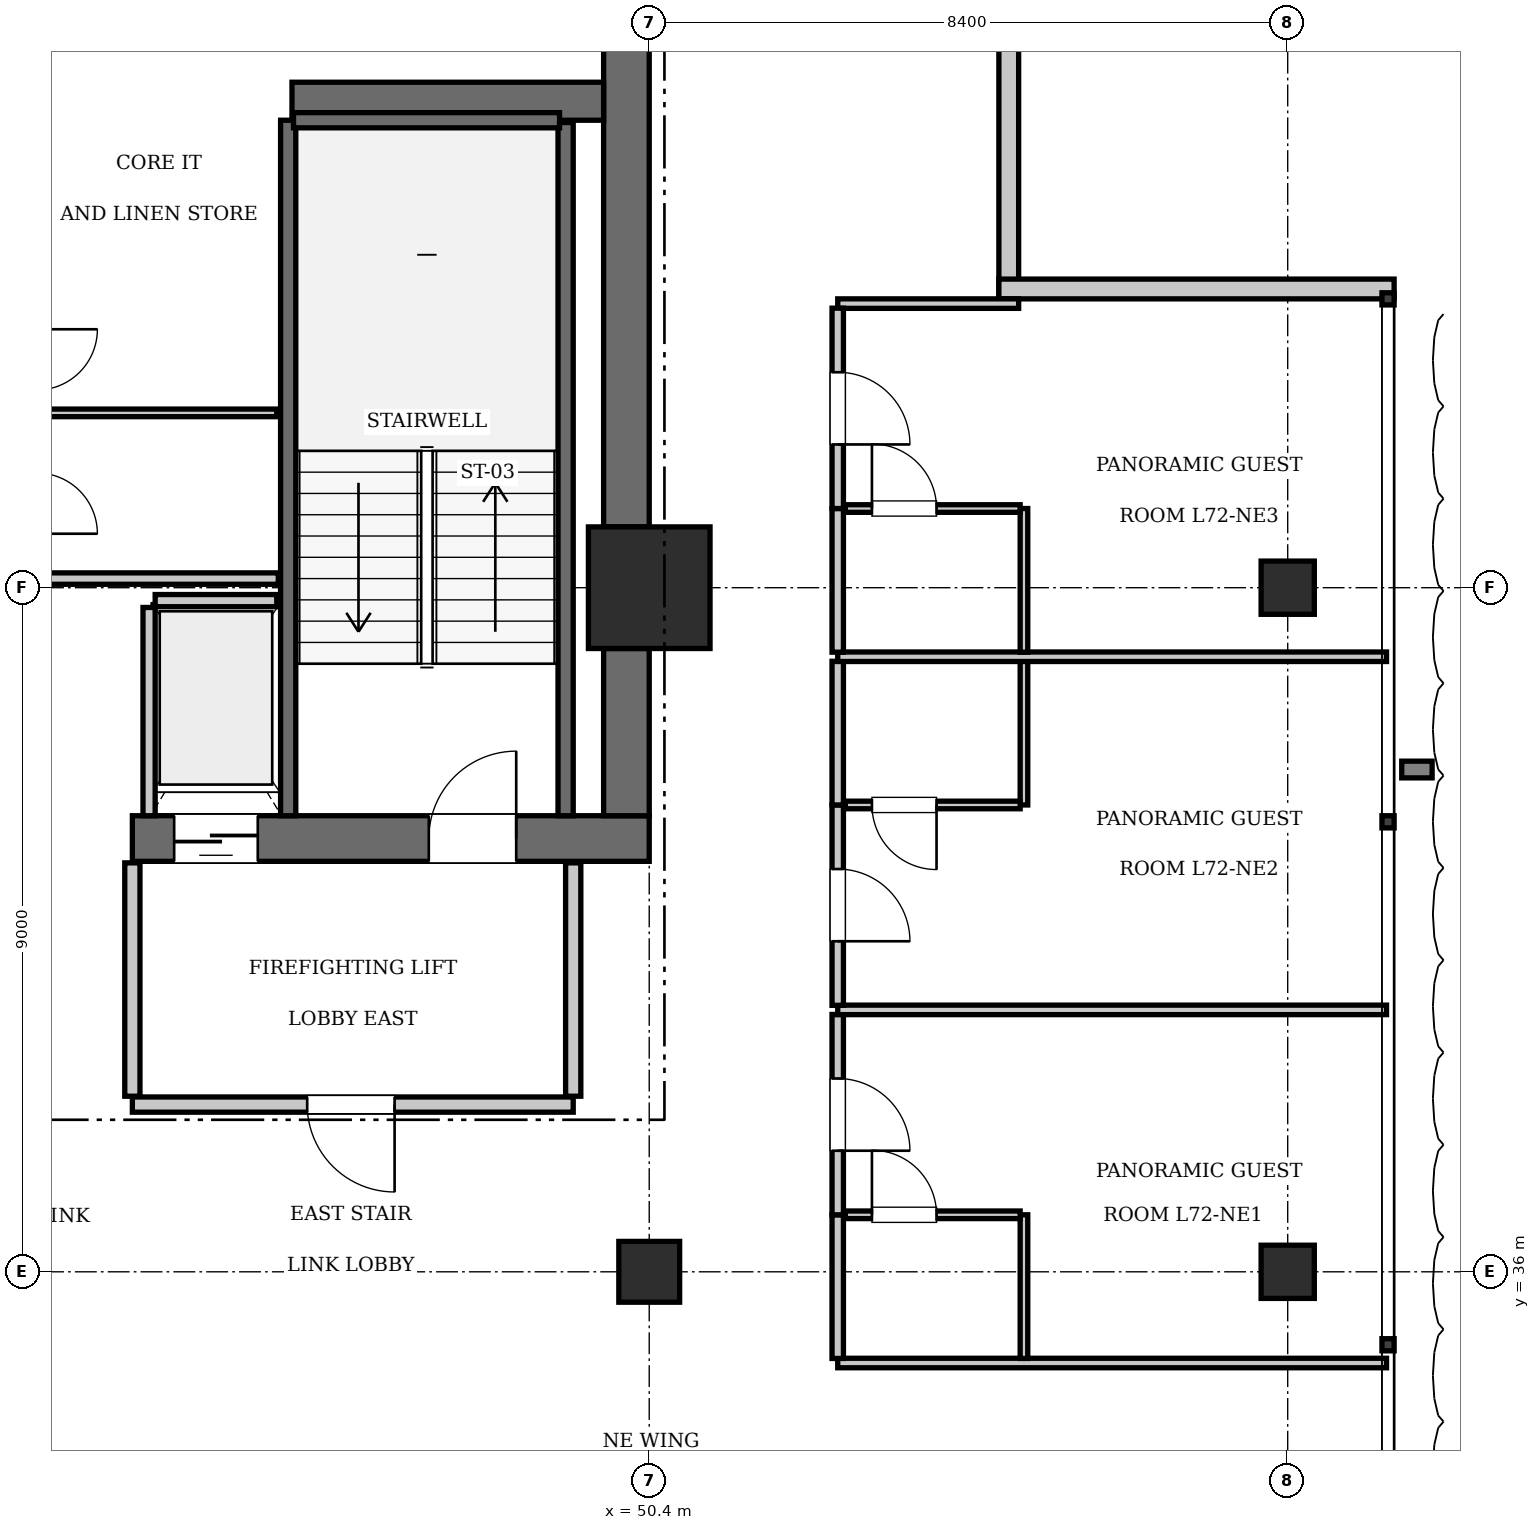
"""IFC4 building model, lengths in metres.
Left out: names, types, materials, properties, quantities, classifications, styles, units other than length and angle.
Written with IfcOpenShell. Run it as: python <this file> out.ifc"""

import sys

from ifc_helpers import new_model, si_unit, direction, frame, frame_2d, origin, origin_2d, place, context, subcontext, project, spatial, rectangle, extrude, element, fill, save


model = new_model("IFC4")
c1 = context("Model", 3, precision=1e-05, world=origin(), true_north=direction((0.0, 1.0)))
c2 = subcontext(c1, "Body", "Model", "MODEL_VIEW")
j1 = project(units=[si_unit("LENGTHUNIT", "METRE"), si_unit("PLANEANGLEUNIT", "RADIAN")], contexts=[c1])
p1 = place(None, origin())
s1 = spatial("IfcSite", under=j1, at=p1, CompositionType="ELEMENT")
p2 = place(p1, origin())
s2 = spatial("IfcBuilding", under=s1, at=p2, CompositionType="ELEMENT")
p3 = place(p2, frame((0.0, 0.0, 293.3)))
s3 = spatial("IfcBuildingStorey", under=s2, at=p3, CompositionType="ELEMENT", Elevation=293.3)
p4 = place(p3, frame((50.4, 45.0, 0.0), z_axis=(0.0, 0.0, 1.0), x_axis=(1.0, 0.0, 0.0)))
e1 = element("IfcColumn", 1, at=p4, inside=s3, PredefinedType="COLUMN", context=c2, shape_type="SweptSolid", body=[
    extrude(rectangle(XDim=1.6, YDim=1.6, at=origin_2d()), origin(), (0.0, 0.0, 1.0), 3.85),
])
p5 = place(p3, frame((43.6, 41.7, 0.0), z_axis=(0.0, 0.0, 1.0), x_axis=(1.0, 0.0, 0.0)))
e2 = element("IfcWall", 2, at=p5, inside=s3, PredefinedType="SHEAR", context=c2, shape_type="SweptSolid", body=[
    extrude(rectangle(XDim=6.8, YDim=0.6, at=frame_2d((3.4, 0.0))), origin(), (0.0, 0.0, 1.0), 3.85),
])
p6 = place(p5, frame((3.9, 0.0, 0.0)))
e3 = element("IfcOpeningElement", 3, at=p6, cuts=e2, PredefinedType="OPENING", context=c2, shape_type="SweptSolid", body=[
    extrude(rectangle(XDim=1.15, YDim=2.15, at=frame_2d((0.575, 1.075))), frame((0.0, 0.31, 0.0), z_axis=(0.0, -1.0, 0.0), x_axis=(1.0, 0.0, 0.0)), (0.0, 0.0, 1.0), 0.62),
])
p7 = place(p5, frame((0.55, 0.0, 0.0)))
e4 = element("IfcOpeningElement", 4, at=p7, cuts=e2, PredefinedType="OPENING", context=c2, shape_type="SweptSolid", body=[
    extrude(rectangle(XDim=1.1, YDim=2.2, at=frame_2d((0.55, 1.1))), frame((0.0, 0.31, 0.0), z_axis=(0.0, -1.0, 0.0), x_axis=(1.0, 0.0, 0.0)), (0.0, 0.0, 1.0), 0.62),
])
p8 = place(p3, frame((50.1, 42.0, 0.0), z_axis=(0.0, 0.0, 1.0), x_axis=(0.0, 1.0, 0.0)))
e5 = element("IfcWall", 5, at=p8, inside=s3, PredefinedType="SHEAR", context=c2, shape_type="SweptSolid", body=[
    extrude(rectangle(XDim=2.2, YDim=0.6, at=frame_2d((1.1, 0.0))), origin(), (0.0, 0.0, 1.0), 3.85),
])
p9 = place(p3, frame((50.1, 45.8, 0.0), z_axis=(0.0, 0.0, 1.0), x_axis=(0.0, 1.0, 0.0)))
e6 = element("IfcWall", 6, at=p9, inside=s3, PredefinedType="SHEAR", context=c2, shape_type="SweptSolid", body=[
    extrude(rectangle(XDim=7.6, YDim=0.6, at=frame_2d((3.8, 0.0))), origin(), (0.0, 0.0, 1.0), 3.85),
])
p10 = place(p3, frame((45.7, 51.4, 0.0), z_axis=(0.0, 0.0, 1.0), x_axis=(1.0, 0.0, 0.0)))
e7 = element("IfcWall", 7, at=p10, inside=s3, PredefinedType="SHEAR", context=c2, shape_type="SweptSolid", body=[
    extrude(rectangle(XDim=4.1, YDim=0.5, at=frame_2d((2.05, 0.0))), origin(), (0.0, 0.0, 1.0), 3.85),
])
p11 = place(p3, frame((50.4, 36.0, 0.0), z_axis=(0.0, 0.0, 1.0), x_axis=(1.0, 0.0, 0.0)))
e8 = element("IfcColumn", 8, at=p11, inside=s3, PredefinedType="COLUMN", context=c2, shape_type="SweptSolid", body=[
    extrude(rectangle(XDim=0.8, YDim=0.8, at=origin_2d()), origin(), (0.0, 0.0, 1.0), 3.85),
])
for number, where, z_axis, x_axis in (
    (9, (58.8, 36.0, 0.0), (0.0, 0.0, 1.0), (1.0, 0.0, 0.0)),
    (10, (58.8, 45.0, 0.0), (0.0, 0.0, 1.0), (1.0, 0.0, 0.0)),
):
    element("IfcColumn", number, at=place(p3, frame(where, z_axis=z_axis, x_axis=x_axis)), inside=s3, PredefinedType="COLUMN", context=c2, shape_type="SweptSolid", body=[
        extrude(rectangle(XDim=0.7, YDim=0.7, at=origin_2d()), origin(), (0.0, 0.0, 1.0), 3.85),
    ])
p12 = place(p3, frame((45.65, 42.0, 0.0), z_axis=(0.0, 0.0, 1.0), x_axis=(0.0, 1.0, 0.0)))
e11 = element("IfcWall", 11, at=p12, inside=s3, PredefinedType="SOLIDWALL", context=c2, shape_type="SweptSolid", body=[
    extrude(rectangle(XDim=9.15, YDim=0.2, at=frame_2d((4.575, 0.0))), origin(), (0.0, 0.0, 1.0), 3.61),
])
p13 = place(p3, frame((49.3, 42.0, 0.0), z_axis=(0.0, 0.0, 1.0), x_axis=(0.0, 1.0, 0.0)))
e12 = element("IfcWall", 12, at=p13, inside=s3, PredefinedType="SOLIDWALL", context=c2, shape_type="SweptSolid", body=[
    extrude(rectangle(XDim=9.12, YDim=0.2, at=frame_2d((4.56, 0.0))), origin(), (0.0, 0.0, 1.0), 3.61),
])
p14 = place(p3, frame((45.72, 51.15, 0.0), z_axis=(0.0, 0.0, 1.0), x_axis=(1.0, 0.0, 0.0)))
e13 = element("IfcWall", 13, at=p14, inside=s3, PredefinedType="SOLIDWALL", context=c2, shape_type="SweptSolid", body=[
    extrude(rectangle(XDim=3.5, YDim=0.2, at=frame_2d((1.75, 0.0))), origin(), (0.0, 0.0, 1.0), 3.61),
])
p15 = place(p3, frame((43.9, 44.83, 0.0), z_axis=(0.0, 0.0, 1.0), x_axis=(1.0, 0.0, 0.0)))
e14 = element("IfcWall", 14, at=p15, inside=s3, PredefinedType="SOLIDWALL", context=c2, shape_type="SweptSolid", body=[
    extrude(rectangle(XDim=1.6, YDim=0.16, at=frame_2d((0.8, 0.0))), origin(), (0.0, 0.0, 1.0), 3.61),
])
p16 = place(p3, frame((43.82, 42.0, 0.0), z_axis=(0.0, 0.0, 1.0), x_axis=(0.0, 1.0, 0.0)))
e15 = element("IfcWall", 15, at=p16, inside=s3, PredefinedType="SOLIDWALL", context=c2, shape_type="SweptSolid", body=[
    extrude(rectangle(XDim=2.74, YDim=0.16, at=frame_2d((1.37, 0.0))), origin(), (0.0, 0.0, 1.0), 3.61),
])
for number, where, z_axis, x_axis in (
    (16, (55.13, 54.0, 0.0), (0.0, 0.0, 1.0), (0.0, -1.0, 0.0)),
    (17, (55.0, 48.93, 0.0), (0.0, 0.0, 1.0), (1.0, 0.0, 0.0)),
):
    element("IfcWall", number, at=place(p3, frame(where, z_axis=z_axis, x_axis=x_axis)), inside=s3, PredefinedType="SOLIDWALL", context=c2, shape_type="SweptSolid", body=[
        extrude(rectangle(XDim=5.2, YDim=0.26, at=frame_2d((2.6, 0.0))), origin(), (0.0, 0.0, 1.0), 3.61),
    ])
p17 = place(p3, frame((43.6, 38.2, 0.0), z_axis=(0.0, 0.0, 1.0), x_axis=(1.0, 0.0, 0.0)))
e18 = element("IfcWall", 18, at=p17, inside=s3, PredefinedType="PARTITIONING", context=c2, shape_type="SweptSolid", body=[
    extrude(rectangle(XDim=5.8, YDim=0.2, at=frame_2d((2.9, 0.0))), origin(), (0.0, 0.0, 1.0), 3.61),
])
p18 = place(p17, frame((2.3, 0.0, 0.0)))
e19 = element("IfcOpeningElement", 19, at=p18, cuts=e18, PredefinedType="OPENING", context=c2, shape_type="SweptSolid", body=[
    extrude(rectangle(XDim=1.15, YDim=2.15, at=frame_2d((0.575, 1.075))), frame((0.0, 0.11, 0.0), z_axis=(0.0, -1.0, 0.0), x_axis=(1.0, 0.0, 0.0)), (0.0, 0.0, 1.0), 0.22),
])
for number, where, z_axis, x_axis in (
    (20, (43.6, 38.31, 0.0), (0.0, 0.0, 1.0), (0.0, 1.0, 0.0)),
    (21, (49.4, 38.31, 0.0), (0.0, 0.0, 1.0), (0.0, 1.0, 0.0)),
):
    element("IfcWall", number, at=place(p3, frame(where, z_axis=z_axis, x_axis=x_axis)), inside=s3, PredefinedType="PARTITIONING", context=c2, shape_type="SweptSolid", body=[
        extrude(rectangle(XDim=3.07, YDim=0.2, at=frame_2d((1.535, 0.0))), origin(), (0.0, 0.0, 1.0), 3.61),
    ])
p19 = place(p3, frame((42.4, 47.3, 0.0), z_axis=(0.0, 0.0, 1.0), x_axis=(1.0, 0.0, 0.0)))
e22 = element("IfcWall", 22, at=p19, inside=s3, PredefinedType="PARTITIONING", context=c2, shape_type="SweptSolid", body=[
    extrude(rectangle(XDim=3.1, YDim=0.1, at=frame_2d((1.55, 0.0))), origin(), (0.0, 0.0, 1.0), 3.61),
])
p20 = place(p3, frame((42.38, 45.12, 0.0), z_axis=(0.0, 0.0, 1.0), x_axis=(1.0, 0.0, 0.0)))
e23 = element("IfcWall", 23, at=p20, inside=s3, PredefinedType="PARTITIONING", context=c2, shape_type="SweptSolid", body=[
    extrude(rectangle(XDim=3.14, YDim=0.15, at=frame_2d((1.57, 0.0))), origin(), (0.0, 0.0, 1.0), 3.61),
])
p21 = place(p3, frame((52.88, 34.8, 0.0), z_axis=(0.0, 0.0, 1.0), x_axis=(1.0, 0.0, 0.0)))
e24 = element("IfcWall", 24, at=p21, inside=s3, PredefinedType="PARTITIONING", context=c2, shape_type="SweptSolid", body=[
    extrude(rectangle(XDim=7.22, YDim=0.125, at=frame_2d((3.61, 0.0))), origin(), (0.0, 0.0, 1.0), 3.61),
])
p22 = place(p3, frame((52.88, 48.738, 0.0), z_axis=(0.0, 0.0, 1.0), x_axis=(1.0, 0.0, 0.0)))
e25 = element("IfcWall", 25, at=p22, inside=s3, PredefinedType="PARTITIONING", context=c2, shape_type="SweptSolid", body=[
    extrude(rectangle(XDim=2.38, YDim=0.125, at=frame_2d((1.19, 0.0))), origin(), (0.0, 0.0, 1.0), 3.61),
])
p23 = place(p3, frame((52.88, 34.86, 0.0), z_axis=(0.0, 0.0, 1.0), x_axis=(0.0, 1.0, 0.0)))
e26 = element("IfcWall", 26, at=p23, inside=s3, PredefinedType="PARTITIONING", context=c2, shape_type="SweptSolid", body=[
    extrude(rectangle(XDim=1.89, YDim=0.15, at=frame_2d((0.945, 0.0))), origin(), (0.0, 0.0, 1.0), 3.61),
])
p24 = place(p3, frame((52.88, 36.75, 0.0), z_axis=(0.0, 0.0, 1.0), x_axis=(0.0, 1.0, 0.0)))
e27 = element("IfcWall", 27, at=p24, inside=s3, PredefinedType="PARTITIONING", context=c2, shape_type="SweptSolid", body=[
    extrude(rectangle(XDim=2.636, YDim=0.15, at=frame_2d((1.318, 0.0))), origin(), (0.0, 0.0, 1.0), 3.61),
])
p25 = place(p24, frame((0.843, 0.0, 0.0)))
e28 = element("IfcOpeningElement", 28, at=p25, cuts=e27, PredefinedType="OPENING", context=c2, shape_type="SweptSolid", body=[
    extrude(rectangle(XDim=0.95, YDim=2.15, at=frame_2d((0.475, 1.075))), frame((0.0, 0.085, 0.0), z_axis=(0.0, -1.0, 0.0), x_axis=(1.0, 0.0, 0.0)), (0.0, 0.0, 1.0), 0.17),
])
p26 = place(p3, frame((55.33, 34.86, 0.0), z_axis=(0.0, 0.0, 1.0), x_axis=(0.0, 1.0, 0.0)))
e29 = element("IfcWall", 29, at=p26, inside=s3, PredefinedType="PARTITIONING", context=c2, shape_type="SweptSolid", body=[
    extrude(rectangle(XDim=1.89, YDim=0.1, at=frame_2d((0.945, 0.0))), origin(), (0.0, 0.0, 1.0), 3.61),
])
p27 = place(p3, frame((52.98, 36.75, 0.0), z_axis=(0.0, 0.0, 1.0), x_axis=(1.0, 0.0, 0.0)))
e30 = element("IfcWall", 30, at=p27, inside=s3, PredefinedType="PARTITIONING", context=c2, shape_type="SweptSolid", body=[
    extrude(rectangle(XDim=2.3, YDim=0.1, at=frame_2d((1.15, 0.0))), origin(), (0.0, 0.0, 1.0), 3.61),
])
p28 = place(p27, frame((0.35, 0.0, 0.0)))
e31 = element("IfcOpeningElement", 31, at=p28, cuts=e30, PredefinedType="OPENING", context=c2, shape_type="SweptSolid", body=[
    extrude(rectangle(XDim=0.85, YDim=2.1, at=frame_2d((0.425, 1.05))), frame((0.0, 0.06, 0.0), z_axis=(0.0, -1.0, 0.0), x_axis=(1.0, 0.0, 0.0)), (0.0, 0.0, 1.0), 0.12),
])
p29 = place(p3, frame((52.88, 39.446, 0.0), z_axis=(0.0, 0.0, 1.0), x_axis=(1.0, 0.0, 0.0)))
e32 = element("IfcWall", 32, at=p29, inside=s3, PredefinedType="PARTITIONING", context=c2, shape_type="SweptSolid", body=[
    extrude(rectangle(XDim=7.22, YDim=0.125, at=frame_2d((3.61, 0.0))), origin(), (0.0, 0.0, 1.0), 3.61),
])
p30 = place(p3, frame((52.88, 39.506, 0.0), z_axis=(0.0, 0.0, 1.0), x_axis=(0.0, 1.0, 0.0)))
e33 = element("IfcWall", 33, at=p30, inside=s3, PredefinedType="PARTITIONING", context=c2, shape_type="SweptSolid", body=[
    extrude(rectangle(XDim=2.636, YDim=0.15, at=frame_2d((1.318, 0.0))), origin(), (0.0, 0.0, 1.0), 3.61),
])
p31 = place(p30, frame((0.843, 0.0, 0.0)))
e34 = element("IfcOpeningElement", 34, at=p31, cuts=e33, PredefinedType="OPENING", context=c2, shape_type="SweptSolid", body=[
    extrude(rectangle(XDim=0.95, YDim=2.15, at=frame_2d((0.475, 1.075))), frame((0.0, 0.085, 0.0), z_axis=(0.0, -1.0, 0.0), x_axis=(1.0, 0.0, 0.0)), (0.0, 0.0, 1.0), 0.17),
])
p32 = place(p3, frame((52.88, 42.142, 0.0), z_axis=(0.0, 0.0, 1.0), x_axis=(0.0, 1.0, 0.0)))
e35 = element("IfcWall", 35, at=p32, inside=s3, PredefinedType="PARTITIONING", context=c2, shape_type="SweptSolid", body=[
    extrude(rectangle(XDim=1.89, YDim=0.15, at=frame_2d((0.945, 0.0))), origin(), (0.0, 0.0, 1.0), 3.61),
])
p33 = place(p3, frame((55.33, 42.142, 0.0), z_axis=(0.0, 0.0, 1.0), x_axis=(0.0, 1.0, 0.0)))
e36 = element("IfcWall", 36, at=p33, inside=s3, PredefinedType="PARTITIONING", context=c2, shape_type="SweptSolid", body=[
    extrude(rectangle(XDim=1.89, YDim=0.1, at=frame_2d((0.945, 0.0))), origin(), (0.0, 0.0, 1.0), 3.61),
])
p34 = place(p3, frame((52.98, 42.142, 0.0), z_axis=(0.0, 0.0, 1.0), x_axis=(1.0, 0.0, 0.0)))
e37 = element("IfcWall", 37, at=p34, inside=s3, PredefinedType="PARTITIONING", context=c2, shape_type="SweptSolid", body=[
    extrude(rectangle(XDim=2.3, YDim=0.1, at=frame_2d((1.15, 0.0))), origin(), (0.0, 0.0, 1.0), 3.61),
])
p35 = place(p34, frame((0.35, 0.0, 0.0)))
e38 = element("IfcOpeningElement", 38, at=p35, cuts=e37, PredefinedType="OPENING", context=c2, shape_type="SweptSolid", body=[
    extrude(rectangle(XDim=0.85, YDim=2.1, at=frame_2d((0.425, 1.05))), frame((0.0, 0.06, 0.0), z_axis=(0.0, -1.0, 0.0), x_axis=(1.0, 0.0, 0.0)), (0.0, 0.0, 1.0), 0.12),
])
p36 = place(p3, frame((52.88, 44.092, 0.0), z_axis=(0.0, 0.0, 1.0), x_axis=(1.0, 0.0, 0.0)))
e39 = element("IfcWall", 39, at=p36, inside=s3, PredefinedType="PARTITIONING", context=c2, shape_type="SweptSolid", body=[
    extrude(rectangle(XDim=7.22, YDim=0.125, at=frame_2d((3.61, 0.0))), origin(), (0.0, 0.0, 1.0), 3.61),
])
p37 = place(p3, frame((52.88, 44.152, 0.0), z_axis=(0.0, 0.0, 1.0), x_axis=(0.0, 1.0, 0.0)))
e40 = element("IfcWall", 40, at=p37, inside=s3, PredefinedType="PARTITIONING", context=c2, shape_type="SweptSolid", body=[
    extrude(rectangle(XDim=1.89, YDim=0.15, at=frame_2d((0.945, 0.0))), origin(), (0.0, 0.0, 1.0), 3.61),
])
p38 = place(p3, frame((52.88, 46.042, 0.0), z_axis=(0.0, 0.0, 1.0), x_axis=(0.0, 1.0, 0.0)))
e41 = element("IfcWall", 41, at=p38, inside=s3, PredefinedType="PARTITIONING", context=c2, shape_type="SweptSolid", body=[
    extrude(rectangle(XDim=2.636, YDim=0.15, at=frame_2d((1.318, 0.0))), origin(), (0.0, 0.0, 1.0), 3.61),
])
p39 = place(p38, frame((0.843, 0.0, 0.0)))
e42 = element("IfcOpeningElement", 42, at=p39, cuts=e41, PredefinedType="OPENING", context=c2, shape_type="SweptSolid", body=[
    extrude(rectangle(XDim=0.95, YDim=2.15, at=frame_2d((0.475, 1.075))), frame((0.0, 0.085, 0.0), z_axis=(0.0, -1.0, 0.0), x_axis=(1.0, 0.0, 0.0)), (0.0, 0.0, 1.0), 0.17),
])
p40 = place(p3, frame((55.33, 44.152, 0.0), z_axis=(0.0, 0.0, 1.0), x_axis=(0.0, 1.0, 0.0)))
e43 = element("IfcWall", 43, at=p40, inside=s3, PredefinedType="PARTITIONING", context=c2, shape_type="SweptSolid", body=[
    extrude(rectangle(XDim=1.89, YDim=0.1, at=frame_2d((0.945, 0.0))), origin(), (0.0, 0.0, 1.0), 3.61),
])
p41 = place(p3, frame((52.98, 46.042, 0.0), z_axis=(0.0, 0.0, 1.0), x_axis=(1.0, 0.0, 0.0)))
e44 = element("IfcWall", 44, at=p41, inside=s3, PredefinedType="PARTITIONING", context=c2, shape_type="SweptSolid", body=[
    extrude(rectangle(XDim=2.3, YDim=0.1, at=frame_2d((1.15, 0.0))), origin(), (0.0, 0.0, 1.0), 3.61),
])
p42 = place(p41, frame((0.35, 0.0, 0.0)))
e45 = element("IfcOpeningElement", 45, at=p42, cuts=e44, PredefinedType="OPENING", context=c2, shape_type="SweptSolid", body=[
    extrude(rectangle(XDim=0.85, YDim=2.1, at=frame_2d((0.425, 1.05))), frame((0.0, 0.06, 0.0), z_axis=(0.0, -1.0, 0.0), x_axis=(1.0, 0.0, 0.0)), (0.0, 0.0, 1.0), 0.12),
])
p43 = place(p6, origin())
e46 = element("IfcDoor", 46, at=p43, inside=s3, OperationType="SINGLE_SWING_RIGHT", PredefinedType="DOOR", context=c2, shape_type="SweptSolid", body=[
    extrude(rectangle(XDim=1.15, YDim=2.15, at=frame_2d((0.575, 1.075))), frame((0.0, 0.025, 0.0), z_axis=(0.0, -1.0, 0.0), x_axis=(1.0, 0.0, 0.0)), (0.0, 0.0, 1.0), 0.05),
])
fill(e3, e46)
p44 = place(p7, frame((1.1, 0.0, 0.0), z_axis=(0.0, 0.0, 1.0), x_axis=(-1.0, 0.0, 0.0)))
e47 = element("IfcDoor", 47, at=p44, inside=s3, OperationType="SLIDING_TO_LEFT", PredefinedType="DOOR", context=c2, shape_type="SweptSolid", body=[
    extrude(rectangle(XDim=1.1, YDim=2.2, at=frame_2d((0.55, 1.1))), frame((0.0, 0.025, 0.0), z_axis=(0.0, -1.0, 0.0), x_axis=(1.0, 0.0, 0.0)), (0.0, 0.0, 1.0), 0.05),
])
fill(e4, e47)
p45 = place(p18, frame((1.15, 0.0, 0.0), z_axis=(0.0, 0.0, 1.0), x_axis=(-1.0, 0.0, 0.0)))
e48 = element("IfcDoor", 48, at=p45, inside=s3, OperationType="SINGLE_SWING_LEFT", PredefinedType="DOOR", context=c2, shape_type="SweptSolid", body=[
    extrude(rectangle(XDim=1.15, YDim=2.15, at=frame_2d((0.575, 1.075))), frame((0.0, 0.025, 0.0), z_axis=(0.0, -1.0, 0.0), x_axis=(1.0, 0.0, 0.0)), (0.0, 0.0, 1.0), 0.05),
])
fill(e19, e48)
p46 = place(p28, origin())
e49 = element("IfcDoor", 49, at=p46, inside=s3, OperationType="SINGLE_SWING_LEFT", PredefinedType="DOOR", context=c2, shape_type="SweptSolid", body=[
    extrude(rectangle(XDim=0.85, YDim=2.1, at=frame_2d((0.425, 1.05))), frame((0.0, 0.025, 0.0), z_axis=(0.0, -1.0, 0.0), x_axis=(1.0, 0.0, 0.0)), (0.0, 0.0, 1.0), 0.05),
])
fill(e31, e49)
p47 = place(p25, frame((0.95, 0.0, 0.0), z_axis=(0.0, 0.0, 1.0), x_axis=(-1.0, 0.0, 0.0)))
e50 = element("IfcDoor", 50, at=p47, inside=s3, OperationType="SINGLE_SWING_RIGHT", PredefinedType="DOOR", context=c2, shape_type="SweptSolid", body=[
    extrude(rectangle(XDim=0.95, YDim=2.15, at=frame_2d((0.475, 1.075))), frame((0.0, 0.025, 0.0), z_axis=(0.0, -1.0, 0.0), x_axis=(1.0, 0.0, 0.0)), (0.0, 0.0, 1.0), 0.05),
])
fill(e28, e50)
p48 = place(p35, frame((0.85, 0.0, 0.0), z_axis=(0.0, 0.0, 1.0), x_axis=(-1.0, 0.0, 0.0)))
e51 = element("IfcDoor", 51, at=p48, inside=s3, OperationType="SINGLE_SWING_LEFT", PredefinedType="DOOR", context=c2, shape_type="SweptSolid", body=[
    extrude(rectangle(XDim=0.85, YDim=2.1, at=frame_2d((0.425, 1.05))), frame((0.0, 0.025, 0.0), z_axis=(0.0, -1.0, 0.0), x_axis=(1.0, 0.0, 0.0)), (0.0, 0.0, 1.0), 0.05),
])
fill(e38, e51)
p49 = place(p31, frame((0.95, 0.0, 0.0), z_axis=(0.0, 0.0, 1.0), x_axis=(-1.0, 0.0, 0.0)))
e52 = element("IfcDoor", 52, at=p49, inside=s3, OperationType="SINGLE_SWING_RIGHT", PredefinedType="DOOR", context=c2, shape_type="SweptSolid", body=[
    extrude(rectangle(XDim=0.95, YDim=2.15, at=frame_2d((0.475, 1.075))), frame((0.0, 0.025, 0.0), z_axis=(0.0, -1.0, 0.0), x_axis=(1.0, 0.0, 0.0)), (0.0, 0.0, 1.0), 0.05),
])
fill(e34, e52)
p50 = place(p42, origin())
e53 = element("IfcDoor", 53, at=p50, inside=s3, OperationType="SINGLE_SWING_LEFT", PredefinedType="DOOR", context=c2, shape_type="SweptSolid", body=[
    extrude(rectangle(XDim=0.85, YDim=2.1, at=frame_2d((0.425, 1.05))), frame((0.0, 0.025, 0.0), z_axis=(0.0, -1.0, 0.0), x_axis=(1.0, 0.0, 0.0)), (0.0, 0.0, 1.0), 0.05),
])
fill(e45, e53)
p51 = place(p39, frame((0.95, 0.0, 0.0), z_axis=(0.0, 0.0, 1.0), x_axis=(-1.0, 0.0, 0.0)))
e54 = element("IfcDoor", 54, at=p51, inside=s3, OperationType="SINGLE_SWING_RIGHT", PredefinedType="DOOR", context=c2, shape_type="SweptSolid", body=[
    extrude(rectangle(XDim=0.95, YDim=2.15, at=frame_2d((0.475, 1.075))), frame((0.0, 0.025, 0.0), z_axis=(0.0, -1.0, 0.0), x_axis=(1.0, 0.0, 0.0)), (0.0, 0.0, 1.0), 0.05),
])
fill(e42, e54)
save(model, sys.argv[1])
